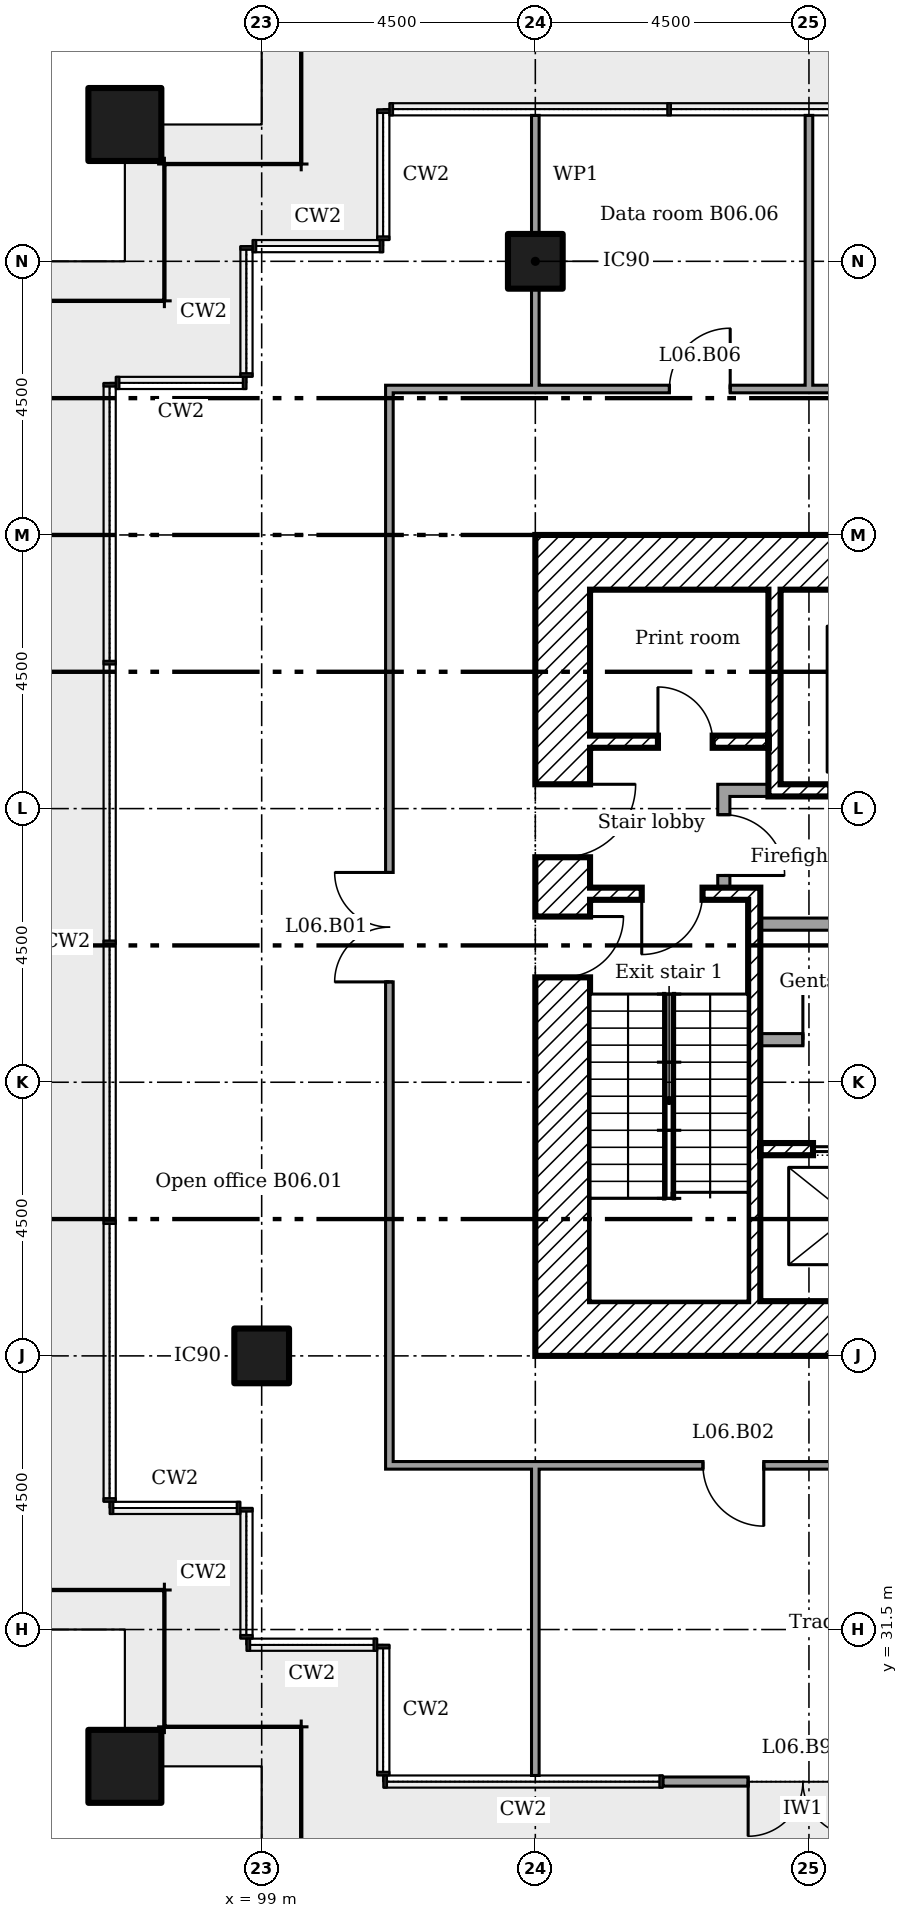
"""IFC4 building model, lengths in metres.
Left out: names, types, materials, properties, quantities, classifications, styles, units other than length and angle.
Written with IfcOpenShell. Run it as: python <this file> out.ifc"""

import sys

from ifc_helpers import new_model, si_unit, direction, frame, frame_2d, origin, origin_2d, place, context, subcontext, project, spatial, rectangle, extrude, element, fill, save


model = new_model("IFC4")
c1 = context("Model", 3, precision=1e-05, world=origin(), true_north=direction((0.0, 1.0)))
c2 = subcontext(c1, "Body", "Model", "MODEL_VIEW")
j1 = project(units=[si_unit("LENGTHUNIT", "METRE"), si_unit("PLANEANGLEUNIT", "RADIAN")], contexts=[c1])
p1 = place(None, origin())
s1 = spatial("IfcSite", under=j1, at=p1, CompositionType="ELEMENT")
p2 = place(p1, origin())
s2 = spatial("IfcBuilding", under=s1, at=p2, CompositionType="ELEMENT")
p3 = place(p2, frame((0.0, 0.0, 29.8)))
s3 = spatial("IfcBuildingStorey", under=s2, at=p3, CompositionType="ELEMENT", Elevation=29.8)
for number, where in (
    (1, (96.75, 56.25, 0.0)),
    (2, (96.75, 29.25, 0.0)),
):
    element("IfcColumn", number, at=place(p3, frame(where)), inside=s3, PredefinedType="COLUMN", context=c2, shape_type="SweptSolid", body=[
        extrude(rectangle(XDim=1.2, YDim=1.2, at=origin_2d()), origin(), (0.0, 0.0, 1.0), 4.4),
    ])
for number, where in (
    (3, (99.0, 36.0, 0.0)),
    (4, (103.5, 54.0, 0.0)),
):
    element("IfcColumn", number, at=place(p3, frame(where)), inside=s3, PredefinedType="COLUMN", context=c2, shape_type="SweptSolid", body=[
        extrude(rectangle(XDim=0.9, YDim=0.9, at=origin_2d()), origin(), (0.0, 0.0, 1.0), 4.4),
    ])
p4 = place(p3, frame((105.6, 29.0, 0.0)))
e5 = element("IfcWall", 5, at=p4, inside=s3, PredefinedType="SOLIDWALL", context=c2, shape_type="SweptSolid", body=[
    extrude(rectangle(XDim=4.6, YDim=0.15, at=frame_2d((2.3, 0.0))), origin(), (0.0, 0.0, 1.0), 4.225),
])
p5 = place(p4, frame((1.4, 0.0, 0.0)))
e6 = element("IfcOpeningElement", 6, at=p5, cuts=e5, PredefinedType="OPENING", context=c2, shape_type="SweptSolid", body=[
    extrude(rectangle(XDim=1.8, YDim=2.4, at=frame_2d((0.9, 1.2))), frame((0.0, 0.085, 0.0), z_axis=(0.0, -1.0, 0.0), x_axis=(1.0, 0.0, 0.0)), (0.0, 0.0, 1.0), 0.17),
])
for number, where in (
    (7, (104.4, 49.05, 0.0)),
    (8, (104.4, 36.45, 0.0)),
):
    element("IfcWall", number, at=place(p3, frame(where)), inside=s3, PredefinedType="SHEAR", context=c2, shape_type="SweptSolid", body=[
        extrude(rectangle(XDim=11.7, YDim=0.9, at=frame_2d((5.85, 0.0))), origin(), (0.0, 0.0, 1.0), 4.125),
    ])
p6 = place(p3, frame((103.95, 36.0, 0.0), z_axis=(0.0, 0.0, 1.0), x_axis=(0.0, 1.0, 0.0)))
e9 = element("IfcWall", 9, at=p6, inside=s3, PredefinedType="SHEAR", context=c2, shape_type="SweptSolid", body=[
    extrude(rectangle(XDim=13.5, YDim=0.9, at=frame_2d((6.75, 0.0))), origin(), (0.0, 0.0, 1.0), 4.125),
])
p7 = place(p6, frame((8.2, 0.0, 0.0)))
e10 = element("IfcOpeningElement", 10, at=p7, cuts=e9, PredefinedType="OPENING", context=c2, shape_type="SweptSolid", body=[
    extrude(rectangle(XDim=1.2, YDim=2.1, at=frame_2d((0.6, 1.05))), frame((0.0, 0.46, 0.0), z_axis=(0.0, -1.0, 0.0), x_axis=(1.0, 0.0, 0.0)), (0.0, 0.0, 1.0), 0.92),
])
p8 = place(p6, frame((6.225, 0.0, 0.0)))
e11 = element("IfcOpeningElement", 11, at=p8, cuts=e9, PredefinedType="OPENING", context=c2, shape_type="SweptSolid", body=[
    extrude(rectangle(XDim=1.0, YDim=2.1, at=frame_2d((0.5, 1.05))), frame((0.0, 0.46, 0.0), z_axis=(0.0, -1.0, 0.0), x_axis=(1.0, 0.0, 0.0)), (0.0, 0.0, 1.0), 0.92),
])
p9 = place(p3, frame((107.433, 48.6, 0.0), z_axis=(0.0, 0.0, 1.0), x_axis=(0.0, -1.0, 0.0)))
e12 = element("IfcWall", 12, at=p9, inside=s3, PredefinedType="SHEAR", context=c2, shape_type="SweptSolid", body=[
    extrude(rectangle(XDim=3.4, YDim=0.2, at=frame_2d((1.7, 0.0))), origin(), (0.0, 0.0, 1.0), 4.125),
])
p10 = place(p3, frame((106.5, 45.3, 0.0)))
e13 = element("IfcWall", 13, at=p10, inside=s3, PredefinedType="PARTITIONING", context=c2, shape_type="SweptSolid", body=[
    extrude(rectangle(XDim=0.833, YDim=0.2, at=frame_2d((0.417, 0.0))), origin(), (0.0, 0.0, 1.0), 4.125),
])
p11 = place(p3, frame((106.6, 43.7, 0.0), z_axis=(0.0, 0.0, 1.0), x_axis=(0.0, 1.0, 0.0)))
e14 = element("IfcWall", 14, at=p11, inside=s3, PredefinedType="PARTITIONING", context=c2, shape_type="SweptSolid", body=[
    extrude(rectangle(XDim=1.5, YDim=0.2, at=frame_2d((0.75, 0.0))), origin(), (0.0, 0.0, 1.0), 4.125),
])
p12 = place(p11, frame((0.2, 0.0, 0.0)))
e15 = element("IfcOpeningElement", 15, at=p12, cuts=e14, PredefinedType="OPENING", context=c2, shape_type="SweptSolid", body=[
    extrude(rectangle(XDim=1.0, YDim=2.1, at=frame_2d((0.5, 1.05))), frame((0.0, 0.11, 0.0), z_axis=(0.0, -1.0, 0.0), x_axis=(1.0, 0.0, 0.0)), (0.0, 0.0, 1.0), 0.22),
])
p13 = place(p3, frame((104.4, 46.1, 0.0)))
e16 = element("IfcWall", 16, at=p13, inside=s3, PredefinedType="SHEAR", context=c2, shape_type="SweptSolid", body=[
    extrude(rectangle(XDim=2.933, YDim=0.2, at=frame_2d((1.467, 0.0))), origin(), (0.0, 0.0, 1.0), 4.125),
])
p14 = place(p13, frame((1.117, 0.0, 0.0)))
e17 = element("IfcOpeningElement", 17, at=p14, cuts=e16, PredefinedType="OPENING", context=c2, shape_type="SweptSolid", body=[
    extrude(rectangle(XDim=0.9, YDim=2.1, at=frame_2d((0.45, 1.05))), frame((0.0, 0.11, 0.0), z_axis=(0.0, -1.0, 0.0), x_axis=(1.0, 0.0, 0.0)), (0.0, 0.0, 1.0), 0.22),
])
p15 = place(p3, frame((107.533, 45.3, 0.0)))
e18 = element("IfcWall", 18, at=p15, inside=s3, PredefinedType="SHEAR", context=c2, shape_type="SweptSolid", body=[
    extrude(rectangle(XDim=2.733, YDim=0.2, at=frame_2d((1.367, 0.0))), origin(), (0.0, 0.0, 1.0), 4.125),
])
p16 = place(p15, frame((0.817, 0.0, 0.0)))
e19 = element("IfcOpeningElement", 19, at=p16, cuts=e18, PredefinedType="OPENING", context=c2, shape_type="SweptSolid", body=[
    extrude(rectangle(XDim=1.1, YDim=2.1, at=frame_2d((0.55, 1.05))), frame((0.0, 0.11, 0.0), z_axis=(0.0, -1.0, 0.0), x_axis=(1.0, 0.0, 0.0)), (0.0, 0.0, 1.0), 0.22),
])
p17 = place(p3, frame((107.2, 39.4, 0.0)))
e20 = element("IfcWall", 20, at=p17, inside=s3, PredefinedType="SHEAR", context=c2, shape_type="SweptSolid", body=[
    extrude(rectangle(XDim=8.9, YDim=0.2, at=frame_2d((4.45, 0.0))), origin(), (0.0, 0.0, 1.0), 4.125),
])
p18 = place(p17, frame((0.867, 0.0, 0.0)))
e21 = element("IfcOpeningElement", 21, at=p18, cuts=e20, PredefinedType="OPENING", context=c2, shape_type="SweptSolid", body=[
    extrude(rectangle(XDim=1.2, YDim=2.1, at=frame_2d((0.6, 1.05))), frame((0.0, 0.11, 0.0), z_axis=(0.0, -1.0, 0.0), x_axis=(1.0, 0.0, 0.0)), (0.0, 0.0, 1.0), 0.22),
])
p19 = place(p17, frame((3.8, 0.0, 0.0)))
e22 = element("IfcOpeningElement", 22, at=p19, cuts=e20, PredefinedType="OPENING", context=c2, shape_type="SweptSolid", body=[
    extrude(rectangle(XDim=1.2, YDim=2.1, at=frame_2d((0.6, 1.05))), frame((0.0, 0.11, 0.0), z_axis=(0.0, -1.0, 0.0), x_axis=(1.0, 0.0, 0.0)), (0.0, 0.0, 1.0), 0.22),
])
p20 = place(p17, frame((6.733, 0.0, 0.0)))
e23 = element("IfcOpeningElement", 23, at=p20, cuts=e20, PredefinedType="OPENING", context=c2, shape_type="SweptSolid", body=[
    extrude(rectangle(XDim=1.2, YDim=2.1, at=frame_2d((0.6, 1.05))), frame((0.0, 0.11, 0.0), z_axis=(0.0, -1.0, 0.0), x_axis=(1.0, 0.0, 0.0)), (0.0, 0.0, 1.0), 0.22),
])
p21 = place(p3, frame((107.1, 36.9, 0.0), z_axis=(0.0, 0.0, 1.0), x_axis=(0.0, 1.0, 0.0)))
e24 = element("IfcWall", 24, at=p21, inside=s3, PredefinedType="SHEAR", context=c2, shape_type="SweptSolid", body=[
    extrude(rectangle(XDim=6.8, YDim=0.2, at=frame_2d((3.4, 0.0))), origin(), (0.0, 0.0, 1.0), 4.125),
])
p22 = place(p3, frame((104.4, 43.6, 0.0)))
e25 = element("IfcWall", 25, at=p22, inside=s3, PredefinedType="SHEAR", context=c2, shape_type="SweptSolid", body=[
    extrude(rectangle(XDim=2.6, YDim=0.2, at=frame_2d((1.3, 0.0))), origin(), (0.0, 0.0, 1.0), 4.125),
])
p23 = place(p22, frame((0.85, 0.0, 0.0)))
e26 = element("IfcOpeningElement", 26, at=p23, cuts=e25, PredefinedType="OPENING", context=c2, shape_type="SweptSolid", body=[
    extrude(rectangle(XDim=1.0, YDim=2.1, at=frame_2d((0.5, 1.05))), frame((0.0, 0.11, 0.0), z_axis=(0.0, -1.0, 0.0), x_axis=(1.0, 0.0, 0.0)), (0.0, 0.0, 1.0), 0.22),
])
p24 = place(p3, frame((107.2, 43.1, 0.0)))
e27 = element("IfcWall", 27, at=p24, inside=s3, PredefinedType="PARTITIONING", context=c2, shape_type="SweptSolid", body=[
    extrude(rectangle(XDim=6.1, YDim=0.2, at=frame_2d((3.05, 0.0))), origin(), (0.0, 0.0, 1.0), 4.125),
])
p25 = place(p24, frame((4.7, 0.0, 0.0)))
e28 = element("IfcOpeningElement", 28, at=p25, cuts=e27, PredefinedType="OPENING", context=c2, shape_type="SweptSolid", body=[
    extrude(rectangle(XDim=0.9, YDim=2.1, at=frame_2d((0.45, 1.05))), frame((0.0, 0.11, 0.0), z_axis=(0.0, -1.0, 0.0), x_axis=(1.0, 0.0, 0.0)), (0.0, 0.0, 1.0), 0.22),
])
p26 = place(p3, frame((107.2, 41.2, 0.0)))
e29 = element("IfcWall", 29, at=p26, inside=s3, PredefinedType="PARTITIONING", context=c2, shape_type="SweptSolid", body=[
    extrude(rectangle(XDim=6.1, YDim=0.2, at=frame_2d((3.05, 0.0))), origin(), (0.0, 0.0, 1.0), 4.125),
])
p27 = place(p26, frame((0.7, 0.0, 0.0)))
e30 = element("IfcOpeningElement", 30, at=p27, cuts=e29, PredefinedType="OPENING", context=c2, shape_type="SweptSolid", body=[
    extrude(rectangle(XDim=0.9, YDim=2.1, at=frame_2d((0.45, 1.05))), frame((0.0, 0.11, 0.0), z_axis=(0.0, -1.0, 0.0), x_axis=(1.0, 0.0, 0.0)), (0.0, 0.0, 1.0), 0.22),
])
p28 = place(p26, frame((2.8, 0.0, 0.0)))
e31 = element("IfcOpeningElement", 31, at=p28, cuts=e29, PredefinedType="OPENING", context=c2, shape_type="SweptSolid", body=[
    extrude(rectangle(XDim=0.9, YDim=2.1, at=frame_2d((0.45, 1.05))), frame((0.0, 0.11, 0.0), z_axis=(0.0, -1.0, 0.0), x_axis=(1.0, 0.0, 0.0)), (0.0, 0.0, 1.0), 0.22),
])
p29 = place(p3, frame((101.038, 34.2, 0.0)))
e32 = element("IfcWall", 32, at=p29, inside=s3, PredefinedType="PARTITIONING", context=c2, shape_type="SweptSolid", body=[
    extrude(rectangle(XDim=19.025, YDim=0.125, at=frame_2d((9.512, 0.0))), origin(), (0.0, 0.0, 1.0), 4.225),
])
p30 = place(p29, frame((5.219, 0.0, 0.0)))
e33 = element("IfcOpeningElement", 33, at=p30, cuts=e32, PredefinedType="OPENING", context=c2, shape_type="SweptSolid", body=[
    extrude(rectangle(XDim=1.0, YDim=2.1, at=frame_2d((0.5, 1.05))), frame((0.0, 0.073, 0.0), z_axis=(0.0, -1.0, 0.0), x_axis=(1.0, 0.0, 0.0)), (0.0, 0.0, 1.0), 0.145),
])
p31 = place(p29, frame((13.667, 0.0, 0.0)))
e34 = element("IfcOpeningElement", 34, at=p31, cuts=e32, PredefinedType="OPENING", context=c2, shape_type="SweptSolid", body=[
    extrude(rectangle(XDim=1.0, YDim=2.1, at=frame_2d((0.5, 1.05))), frame((0.0, 0.073, 0.0), z_axis=(0.0, -1.0, 0.0), x_axis=(1.0, 0.0, 0.0)), (0.0, 0.0, 1.0), 0.145),
])
p32 = place(p3, frame((101.038, 51.9, 0.0)))
e35 = element("IfcWall", 35, at=p32, inside=s3, PredefinedType="PARTITIONING", context=c2, shape_type="SweptSolid", body=[
    extrude(rectangle(XDim=19.025, YDim=0.125, at=frame_2d((9.512, 0.0))), origin(), (0.0, 0.0, 1.0), 4.225),
])
p33 = place(p32, frame((9.719, 0.0, 0.0)))
e36 = element("IfcOpeningElement", 36, at=p33, cuts=e35, PredefinedType="OPENING", context=c2, shape_type="SweptSolid", body=[
    extrude(rectangle(XDim=1.0, YDim=2.1, at=frame_2d((0.5, 1.05))), frame((0.0, 0.073, 0.0), z_axis=(0.0, -1.0, 0.0), x_axis=(1.0, 0.0, 0.0)), (0.0, 0.0, 1.0), 0.145),
])
p34 = place(p32, frame((4.667, 0.0, 0.0)))
e37 = element("IfcOpeningElement", 37, at=p34, cuts=e35, PredefinedType="OPENING", context=c2, shape_type="SweptSolid", body=[
    extrude(rectangle(XDim=1.0, YDim=2.1, at=frame_2d((0.5, 1.05))), frame((0.0, 0.073, 0.0), z_axis=(0.0, -1.0, 0.0), x_axis=(1.0, 0.0, 0.0)), (0.0, 0.0, 1.0), 0.145),
])
p35 = place(p3, frame((101.1, 34.262, 0.0), z_axis=(0.0, 0.0, 1.0), x_axis=(0.0, 1.0, 0.0)))
e38 = element("IfcWall", 38, at=p35, inside=s3, PredefinedType="PARTITIONING", context=c2, shape_type="SweptSolid", body=[
    extrude(rectangle(XDim=17.575, YDim=0.125, at=frame_2d((8.788, 0.0))), origin(), (0.0, 0.0, 1.0), 4.225),
])
p36 = place(p35, frame((7.887, 0.0, 0.0)))
e39 = element("IfcOpeningElement", 39, at=p36, cuts=e38, PredefinedType="OPENING", context=c2, shape_type="SweptSolid", body=[
    extrude(rectangle(XDim=1.8, YDim=2.1, at=frame_2d((0.9, 1.05))), frame((0.0, 0.073, 0.0), z_axis=(0.0, -1.0, 0.0), x_axis=(1.0, 0.0, 0.0)), (0.0, 0.0, 1.0), 0.145),
])
p37 = place(p3, frame((103.5, 29.1, 0.0), z_axis=(0.0, 0.0, 1.0), x_axis=(0.0, 1.0, 0.0)))
e40 = element("IfcWall", 40, at=p37, inside=s3, PredefinedType="PARTITIONING", context=c2, shape_type="SweptSolid", body=[
    extrude(rectangle(XDim=5.1, YDim=0.125, at=frame_2d((2.55, 0.0))), origin(), (0.0, 0.0, 1.0), 3.613),
])
p38 = place(p3, frame((103.5, 51.9, 0.0), z_axis=(0.0, 0.0, 1.0), x_axis=(0.0, 1.0, 0.0)))
e41 = element("IfcWall", 41, at=p38, inside=s3, PredefinedType="PARTITIONING", context=c2, shape_type="SweptSolid", body=[
    extrude(rectangle(XDim=1.65, YDim=0.125, at=frame_2d((0.825, 0.0))), origin(), (0.0, 0.0, 1.0), 3.602),
])
p39 = place(p3, frame((103.5, 54.45, 0.0), z_axis=(0.0, 0.0, 1.0), x_axis=(0.0, 1.0, 0.0)))
e42 = element("IfcWall", 42, at=p39, inside=s3, PredefinedType="PARTITIONING", context=c2, shape_type="SweptSolid", body=[
    extrude(rectangle(XDim=1.95, YDim=0.125, at=frame_2d((0.975, 0.0))), origin(), (0.0, 0.0, 1.0), 3.602),
])
p40 = place(p3, frame((108.0, 51.9, 0.0), z_axis=(0.0, 0.0, 1.0), x_axis=(0.0, 1.0, 0.0)))
e43 = element("IfcWall", 43, at=p40, inside=s3, PredefinedType="PARTITIONING", context=c2, shape_type="SweptSolid", body=[
    extrude(rectangle(XDim=4.5, YDim=0.125, at=frame_2d((2.25, 0.0))), origin(), (0.0, 0.0, 1.0), 3.613),
])
p41 = place(p5, frame((1.8, 0.0, 0.0), x_axis=(-1.0, 0.0, 0.0)))
e44 = element("IfcDoor", 44, at=p41, inside=s3, OperationType="DOUBLE_DOOR_DOUBLE_SWING", PredefinedType="NOTDEFINED", context=c2, shape_type="SweptSolid", body=[
    extrude(rectangle(XDim=1.8, YDim=2.4, at=frame_2d((0.9, 1.2))), frame((0.0, 0.025, 0.0), z_axis=(0.0, -1.0, 0.0), x_axis=(1.0, 0.0, 0.0)), (0.0, 0.0, 1.0), 0.05),
])
fill(e6, e44)
p42 = place(p7, frame((1.2, 0.0, 0.0), x_axis=(-1.0, 0.0, 0.0)))
e45 = element("IfcDoor", 45, at=p42, inside=s3, OperationType="SINGLE_SWING_RIGHT", PredefinedType="DOOR", context=c2, shape_type="SweptSolid", body=[
    extrude(rectangle(XDim=1.2, YDim=2.1, at=frame_2d((0.6, 1.05))), frame((0.0, 0.025, 0.0), z_axis=(0.0, -1.0, 0.0), x_axis=(1.0, 0.0, 0.0)), (0.0, 0.0, 1.0), 0.05),
])
fill(e10, e45)
p43 = place(p23, frame((1.0, 0.0, 0.0), x_axis=(-1.0, 0.0, 0.0)))
e46 = element("IfcDoor", 46, at=p43, inside=s3, OperationType="SINGLE_SWING_LEFT", PredefinedType="DOOR", context=c2, shape_type="SweptSolid", body=[
    extrude(rectangle(XDim=1.0, YDim=2.1, at=frame_2d((0.5, 1.05))), frame((0.0, 0.025, 0.0), z_axis=(0.0, -1.0, 0.0), x_axis=(1.0, 0.0, 0.0)), (0.0, 0.0, 1.0), 0.05),
])
fill(e26, e46)
p44 = place(p8, frame((1.0, 0.0, 0.0), x_axis=(-1.0, 0.0, 0.0)))
e47 = element("IfcDoor", 47, at=p44, inside=s3, OperationType="SINGLE_SWING_RIGHT", PredefinedType="DOOR", context=c2, shape_type="SweptSolid", body=[
    extrude(rectangle(XDim=1.0, YDim=2.1, at=frame_2d((0.5, 1.05))), frame((0.0, 0.025, 0.0), z_axis=(0.0, -1.0, 0.0), x_axis=(1.0, 0.0, 0.0)), (0.0, 0.0, 1.0), 0.05),
])
fill(e11, e47)
p45 = place(p12, frame((1.0, 0.0, 0.0), x_axis=(-1.0, 0.0, 0.0)))
e48 = element("IfcDoor", 48, at=p45, inside=s3, OperationType="SINGLE_SWING_LEFT", PredefinedType="DOOR", context=c2, shape_type="SweptSolid", body=[
    extrude(rectangle(XDim=1.0, YDim=2.1, at=frame_2d((0.5, 1.05))), frame((0.0, 0.025, 0.0), z_axis=(0.0, -1.0, 0.0), x_axis=(1.0, 0.0, 0.0)), (0.0, 0.0, 1.0), 0.05),
])
fill(e15, e48)
p46 = place(p14, origin())
e49 = element("IfcDoor", 49, at=p46, inside=s3, OperationType="SINGLE_SWING_RIGHT", PredefinedType="DOOR", context=c2, shape_type="SweptSolid", body=[
    extrude(rectangle(XDim=0.9, YDim=2.1, at=frame_2d((0.45, 1.05))), frame((0.0, 0.025, 0.0), z_axis=(0.0, -1.0, 0.0), x_axis=(1.0, 0.0, 0.0)), (0.0, 0.0, 1.0), 0.05),
])
fill(e17, e49)
p47 = place(p27, origin())
e50 = element("IfcDoor", 50, at=p47, inside=s3, OperationType="SINGLE_SWING_RIGHT", PredefinedType="DOOR", context=c2, shape_type="SweptSolid", body=[
    extrude(rectangle(XDim=0.9, YDim=2.1, at=frame_2d((0.45, 1.05))), frame((0.0, 0.025, 0.0), z_axis=(0.0, -1.0, 0.0), x_axis=(1.0, 0.0, 0.0)), (0.0, 0.0, 1.0), 0.05),
])
fill(e30, e50)
p48 = place(p18, origin())
e51 = element("IfcDoor", 51, at=p48, inside=s3, OperationType="SLIDING_TO_LEFT", PredefinedType="DOOR", context=c2, shape_type="SweptSolid", body=[
    extrude(rectangle(XDim=1.2, YDim=2.1, at=frame_2d((0.6, 1.05))), frame((0.0, 0.025, 0.0), z_axis=(0.0, -1.0, 0.0), x_axis=(1.0, 0.0, 0.0)), (0.0, 0.0, 1.0), 0.05),
])
fill(e21, e51)
p49 = place(p36, origin())
e52 = element("IfcDoor", 52, at=p49, inside=s3, OperationType="DOUBLE_DOOR_SINGLE_SWING", PredefinedType="DOOR", context=c2, shape_type="SweptSolid", body=[
    extrude(rectangle(XDim=1.8, YDim=2.1, at=frame_2d((0.9, 1.05))), frame((0.0, 0.025, 0.0), z_axis=(0.0, -1.0, 0.0), x_axis=(1.0, 0.0, 0.0)), (0.0, 0.0, 1.0), 0.05),
])
fill(e39, e52)
p50 = place(p30, frame((1.0, 0.0, 0.0), x_axis=(-1.0, 0.0, 0.0)))
e53 = element("IfcDoor", 53, at=p50, inside=s3, OperationType="SINGLE_SWING_RIGHT", PredefinedType="DOOR", context=c2, shape_type="SweptSolid", body=[
    extrude(rectangle(XDim=1.0, YDim=2.1, at=frame_2d((0.5, 1.05))), frame((0.0, 0.025, 0.0), z_axis=(0.0, -1.0, 0.0), x_axis=(1.0, 0.0, 0.0)), (0.0, 0.0, 1.0), 0.05),
])
fill(e33, e53)
p51 = place(p34, origin())
e54 = element("IfcDoor", 54, at=p51, inside=s3, OperationType="SINGLE_SWING_LEFT", PredefinedType="DOOR", context=c2, shape_type="SweptSolid", body=[
    extrude(rectangle(XDim=1.0, YDim=2.1, at=frame_2d((0.5, 1.05))), frame((0.0, 0.025, 0.0), z_axis=(0.0, -1.0, 0.0), x_axis=(1.0, 0.0, 0.0)), (0.0, 0.0, 1.0), 0.05),
])
fill(e37, e54)
save(model, sys.argv[1])
